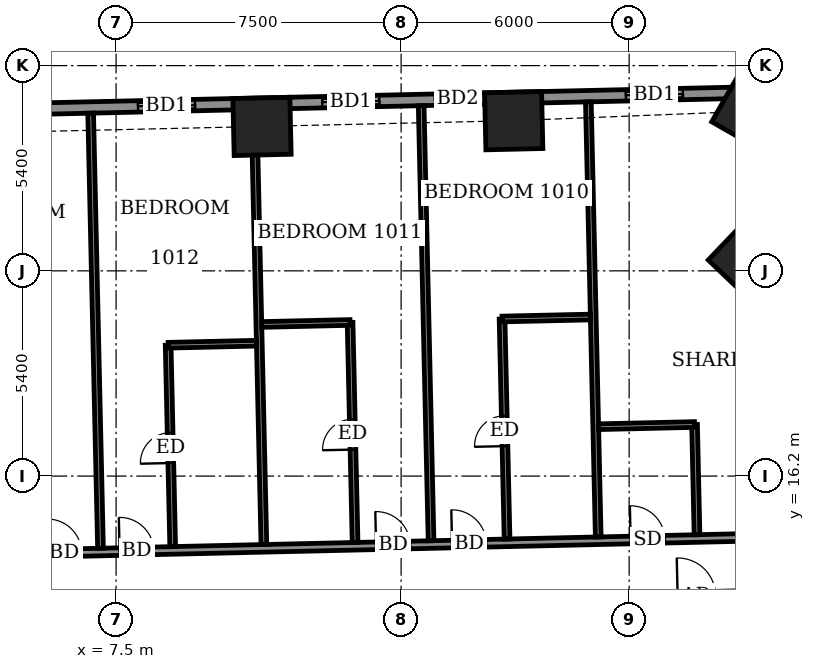
"""IFC4 building model, lengths in metres.
Left out: names, types, materials, properties, quantities, classifications, styles, units other than length and angle.
Written with IfcOpenShell. Run it as: python <this file> out.ifc"""

import sys

from ifc_helpers import new_model, si_unit, direction, frame, frame_2d, origin, origin_2d, place, context, subcontext, project, spatial, rectangle, extrude, element, fill, save


model = new_model("IFC4")
c1 = context("Model", 3, precision=1e-05, world=origin(), true_north=direction((0.0, 1.0)))
c2 = subcontext(c1, "Body", "Model", "MODEL_VIEW")
j1 = project(units=[si_unit("LENGTHUNIT", "METRE"), si_unit("PLANEANGLEUNIT", "RADIAN")], contexts=[c1])
p1 = place(None, origin())
s1 = spatial("IfcSite", under=j1, at=p1, CompositionType="ELEMENT")
p2 = place(p1, origin())
s2 = spatial("IfcBuilding", under=s1, at=p2, CompositionType="ELEMENT")
p3 = place(p2, frame((0.0, 0.0, 44.9)))
s3 = spatial("IfcBuildingStorey", under=s2, at=p3, CompositionType="ELEMENT", Elevation=44.9)
for number, where, z_axis, x_axis in (
    (1, (24.142, 21.91, -0.55), (0.0, 0.0, 1.0), (-0.723, 0.691, 0.0)),
    (2, (24.196, 25.8, -0.55), (0.0, 0.0, 1.0), (-0.868, 0.497, 0.0)),
    (3, (17.963, 25.551, -0.55), (0.0, 0.0, 1.0), (-1.0, -0.023, 0.0)),
    (4, (11.34, 25.4, -0.55), (0.0, 0.0, 1.0), (-1.0, -0.023, 0.0)),
):
    element("IfcColumn", number, at=place(p3, frame(where, z_axis=z_axis, x_axis=x_axis)), inside=s3, PredefinedType="COLUMN", context=c2, shape_type="SweptSolid", body=[
        extrude(rectangle(XDim=1.5, YDim=1.5, at=origin_2d()), origin(), (0.0, 0.0, 1.0), 3.6),
    ])
p4 = place(p3, frame((24.423, 26.298, 0.0), z_axis=(0.0, 0.0, 1.0), x_axis=(-0.999742433108, -0.022695097355, 0.0)))
e5 = element("IfcWall", 5, at=p4, inside=s3, PredefinedType="SOLIDWALL", context=c2, shape_type="SweptSolid", body=[
    extrude(rectangle(XDim=52.701, YDim=0.3, at=frame_2d((26.35, 0.0))), origin(), (0.0, 0.0, 1.0), 3.05),
])
p5 = place(p4, frame((2.009, 0.0, 0.0)))
e6 = element("IfcOpeningElement", 6, at=p5, cuts=e5, PredefinedType="OPENING", context=c2, shape_type="SweptSolid", body=[
    extrude(rectangle(XDim=1.5, YDim=2.4, at=frame_2d((0.75, 1.2))), frame((0.0, 0.16, 0.0), z_axis=(0.0, -1.0, 0.0), x_axis=(1.0, 0.0, 0.0)), (0.0, 0.0, 1.0), 0.32),
])
p6 = place(p4, frame((7.337, 0.0, 0.0)))
e7 = element("IfcOpeningElement", 7, at=p6, cuts=e5, PredefinedType="OPENING", context=c2, shape_type="SweptSolid", body=[
    extrude(rectangle(XDim=1.2, YDim=2.4, at=frame_2d((0.6, 1.2))), frame((0.0, 0.16, 0.0), z_axis=(0.0, -1.0, 0.0), x_axis=(1.0, 0.0, 0.0)), (0.0, 0.0, 1.0), 0.32),
])
p7 = place(p4, frame((10.0, 0.0, 0.0)))
e8 = element("IfcOpeningElement", 8, at=p7, cuts=e5, PredefinedType="OPENING", context=c2, shape_type="SweptSolid", body=[
    extrude(rectangle(XDim=1.5, YDim=2.4, at=frame_2d((0.75, 1.2))), frame((0.0, 0.16, 0.0), z_axis=(0.0, -1.0, 0.0), x_axis=(1.0, 0.0, 0.0)), (0.0, 0.0, 1.0), 0.32),
])
p8 = place(p4, frame((14.85, 0.0, 0.0)))
e9 = element("IfcOpeningElement", 9, at=p8, cuts=e5, PredefinedType="OPENING", context=c2, shape_type="SweptSolid", body=[
    extrude(rectangle(XDim=1.5, YDim=2.4, at=frame_2d((0.75, 1.2))), frame((0.0, 0.16, 0.0), z_axis=(0.0, -1.0, 0.0), x_axis=(1.0, 0.0, 0.0)), (0.0, 0.0, 1.0), 0.32),
])
p9 = place(p4, frame((20.638, 0.0, 0.9)))
e10 = element("IfcOpeningElement", 10, at=p9, cuts=e5, PredefinedType="OPENING", context=c2, shape_type="SweptSolid", body=[
    extrude(rectangle(XDim=0.9, YDim=1.5, at=frame_2d((0.45, 0.75))), frame((0.0, 0.16, 0.0), z_axis=(0.0, -1.0, 0.0), x_axis=(1.0, 0.0, 0.0)), (0.0, 0.0, 1.0), 0.32),
])
p10 = place(p4, frame((23.125, 0.0, 0.0)))
e11 = element("IfcOpeningElement", 11, at=p10, cuts=e5, PredefinedType="OPENING", context=c2, shape_type="SweptSolid", body=[
    extrude(rectangle(XDim=1.5, YDim=2.4, at=frame_2d((0.75, 1.2))), frame((0.0, 0.16, 0.0), z_axis=(0.0, -1.0, 0.0), x_axis=(1.0, 0.0, 0.0)), (0.0, 0.0, 1.0), 0.32),
])
p11 = place(p4, frame((27.9, 0.0, 0.0)))
e12 = element("IfcOpeningElement", 12, at=p11, cuts=e5, PredefinedType="OPENING", context=c2, shape_type="SweptSolid", body=[
    extrude(rectangle(XDim=1.5, YDim=2.4, at=frame_2d((0.75, 1.2))), frame((0.0, 0.16, 0.0), z_axis=(0.0, -1.0, 0.0), x_axis=(1.0, 0.0, 0.0)), (0.0, 0.0, 1.0), 0.32),
])
p12 = place(p4, frame((30.862, 0.0, 0.0)))
e13 = element("IfcOpeningElement", 13, at=p12, cuts=e5, PredefinedType="OPENING", context=c2, shape_type="SweptSolid", body=[
    extrude(rectangle(XDim=1.2, YDim=2.4, at=frame_2d((0.6, 1.2))), frame((0.0, 0.16, 0.0), z_axis=(0.0, -1.0, 0.0), x_axis=(1.0, 0.0, 0.0)), (0.0, 0.0, 1.0), 0.32),
])
p13 = place(p4, frame((36.1, 0.0, 0.0)))
e14 = element("IfcOpeningElement", 14, at=p13, cuts=e5, PredefinedType="OPENING", context=c2, shape_type="SweptSolid", body=[
    extrude(rectangle(XDim=1.5, YDim=2.4, at=frame_2d((0.75, 1.2))), frame((0.0, 0.16, 0.0), z_axis=(0.0, -1.0, 0.0), x_axis=(1.0, 0.0, 0.0)), (0.0, 0.0, 1.0), 0.32),
])
p14 = place(p4, frame((40.975, 0.0, 0.0)))
e15 = element("IfcOpeningElement", 15, at=p14, cuts=e5, PredefinedType="OPENING", context=c2, shape_type="SweptSolid", body=[
    extrude(rectangle(XDim=1.5, YDim=2.4, at=frame_2d((0.75, 1.2))), frame((0.0, 0.16, 0.0), z_axis=(0.0, -1.0, 0.0), x_axis=(1.0, 0.0, 0.0)), (0.0, 0.0, 1.0), 0.32),
])
p15 = place(p4, frame((43.788, 0.0, 0.0)))
e16 = element("IfcOpeningElement", 16, at=p15, cuts=e5, PredefinedType="OPENING", context=c2, shape_type="SweptSolid", body=[
    extrude(rectangle(XDim=1.5, YDim=2.4, at=frame_2d((0.75, 1.2))), frame((0.0, 0.16, 0.0), z_axis=(0.0, -1.0, 0.0), x_axis=(1.0, 0.0, 0.0)), (0.0, 0.0, 1.0), 0.32),
])
p16 = place(p4, frame((48.464, 0.0, 0.9)))
e17 = element("IfcOpeningElement", 17, at=p16, cuts=e5, PredefinedType="OPENING", context=c2, shape_type="SweptSolid", body=[
    extrude(rectangle(XDim=2.4, YDim=1.5, at=frame_2d((1.2, 0.75))), frame((0.0, 0.16, 0.0), z_axis=(0.0, -1.0, 0.0), x_axis=(1.0, 0.0, 0.0)), (0.0, 0.0, 1.0), 0.32),
])
p17 = place(p3, frame((2.746, 27.256, 0.0), z_axis=(0.0, 0.0, 1.0), x_axis=(0.999743073592, 0.022666865795, 0.0)))
e18 = element("IfcWall", 18, at=p17, inside=s3, PredefinedType="USERDEFINED", context=c2, shape_type="SweptSolid", body=[
    extrude(rectangle(XDim=5.999, YDim=0.55, at=frame_2d((3.0, 0.0))), origin(), (0.0, 0.0, 1.0), 0.8),
])
p18 = place(p3, frame((16.679, 12.918, 0.0), z_axis=(0.0, 0.0, 1.0), x_axis=(0.999742162372, 0.022707020428, 0.0)))
e19 = element("IfcWall", 19, at=p18, inside=s3, PredefinedType="PARTITIONING", context=c2, shape_type="SweptSolid", body=[
    extrude(rectangle(XDim=10.795, YDim=0.2, at=frame_2d((5.397, 0.0))), origin(), (0.0, 0.0, 1.0), 3.05),
])
p19 = place(p18, frame((5.598, 0.0, 0.0)))
e20 = element("IfcOpeningElement", 20, at=p19, cuts=e19, PredefinedType="OPENING", context=c2, shape_type="SweptSolid", body=[
    extrude(rectangle(XDim=1.0, YDim=2.1, at=frame_2d((0.5, 1.05))), frame((0.0, 0.11, 0.0), z_axis=(0.0, -1.0, 0.0), x_axis=(1.0, 0.0, 0.0)), (0.0, 0.0, 1.0), 0.22),
])
p20 = place(p3, frame((-31.347, 13.329, 0.0), z_axis=(0.0, 0.0, 1.0), x_axis=(0.999742613079, 0.022687168058, 0.0)))
e21 = element("IfcWall", 21, at=p20, inside=s3, PredefinedType="PARTITIONING", context=c2, shape_type="SweptSolid", body=[
    extrude(rectangle(XDim=58.799, YDim=0.2, at=frame_2d((29.399, 0.0))), origin(), (0.0, 0.0, 1.0), 3.05),
])
p21 = place(p20, frame((56.675, 0.0, 0.0)))
e22 = element("IfcOpeningElement", 22, at=p21, cuts=e21, PredefinedType="OPENING", context=c2, shape_type="SweptSolid", body=[
    extrude(rectangle(XDim=1.0, YDim=2.1, at=frame_2d((0.5, 1.05))), frame((0.0, 0.11, 0.0), z_axis=(0.0, -1.0, 0.0), x_axis=(1.0, 0.0, 0.0)), (0.0, 0.0, 1.0), 0.22),
])
p22 = place(p20, frame((52.4, 0.0, 0.0)))
e23 = element("IfcOpeningElement", 23, at=p22, cuts=e21, PredefinedType="OPENING", context=c2, shape_type="SweptSolid", body=[
    extrude(rectangle(XDim=0.9, YDim=2.1, at=frame_2d((0.45, 1.05))), frame((0.0, 0.11, 0.0), z_axis=(0.0, -1.0, 0.0), x_axis=(1.0, 0.0, 0.0)), (0.0, 0.0, 1.0), 0.22),
])
p23 = place(p20, frame((47.7, 0.0, 0.0)))
e24 = element("IfcOpeningElement", 24, at=p23, cuts=e21, PredefinedType="OPENING", context=c2, shape_type="SweptSolid", body=[
    extrude(rectangle(XDim=0.9, YDim=2.1, at=frame_2d((0.45, 1.05))), frame((0.0, 0.11, 0.0), z_axis=(0.0, -1.0, 0.0), x_axis=(1.0, 0.0, 0.0)), (0.0, 0.0, 1.0), 0.22),
])
p24 = place(p20, frame((45.7, 0.0, 0.0)))
e25 = element("IfcOpeningElement", 25, at=p24, cuts=e21, PredefinedType="OPENING", context=c2, shape_type="SweptSolid", body=[
    extrude(rectangle(XDim=0.9, YDim=2.1, at=frame_2d((0.45, 1.05))), frame((0.0, 0.11, 0.0), z_axis=(0.0, -1.0, 0.0), x_axis=(1.0, 0.0, 0.0)), (0.0, 0.0, 1.0), 0.22),
])
p25 = place(p20, frame((38.95, 0.0, 0.0)))
e26 = element("IfcOpeningElement", 26, at=p25, cuts=e21, PredefinedType="OPENING", context=c2, shape_type="SweptSolid", body=[
    extrude(rectangle(XDim=0.9, YDim=2.1, at=frame_2d((0.45, 1.05))), frame((0.0, 0.11, 0.0), z_axis=(0.0, -1.0, 0.0), x_axis=(1.0, 0.0, 0.0)), (0.0, 0.0, 1.0), 0.22),
])
p26 = place(p20, frame((37.05, 0.0, 0.0)))
e27 = element("IfcOpeningElement", 27, at=p26, cuts=e21, PredefinedType="OPENING", context=c2, shape_type="SweptSolid", body=[
    extrude(rectangle(XDim=0.9, YDim=2.1, at=frame_2d((0.45, 1.05))), frame((0.0, 0.11, 0.0), z_axis=(0.0, -1.0, 0.0), x_axis=(1.0, 0.0, 0.0)), (0.0, 0.0, 1.0), 0.22),
])
p27 = place(p20, frame((30.375, 0.0, 0.0)))
e28 = element("IfcOpeningElement", 28, at=p27, cuts=e21, PredefinedType="OPENING", context=c2, shape_type="SweptSolid", body=[
    extrude(rectangle(XDim=0.9, YDim=2.1, at=frame_2d((0.45, 1.05))), frame((0.0, 0.11, 0.0), z_axis=(0.0, -1.0, 0.0), x_axis=(1.0, 0.0, 0.0)), (0.0, 0.0, 1.0), 0.22),
])
p28 = place(p20, frame((28.5, 0.0, 0.0)))
e29 = element("IfcOpeningElement", 29, at=p28, cuts=e21, PredefinedType="OPENING", context=c2, shape_type="SweptSolid", body=[
    extrude(rectangle(XDim=0.9, YDim=2.1, at=frame_2d((0.45, 1.05))), frame((0.0, 0.11, 0.0), z_axis=(0.0, -1.0, 0.0), x_axis=(1.0, 0.0, 0.0)), (0.0, 0.0, 1.0), 0.22),
])
p29 = place(p20, frame((21.825, 0.0, 0.0)))
e30 = element("IfcOpeningElement", 30, at=p29, cuts=e21, PredefinedType="OPENING", context=c2, shape_type="SweptSolid", body=[
    extrude(rectangle(XDim=0.9, YDim=2.1, at=frame_2d((0.45, 1.05))), frame((0.0, 0.11, 0.0), z_axis=(0.0, -1.0, 0.0), x_axis=(1.0, 0.0, 0.0)), (0.0, 0.0, 1.0), 0.22),
])
p30 = place(p20, frame((19.95, 0.0, 0.0)))
e31 = element("IfcOpeningElement", 31, at=p30, cuts=e21, PredefinedType="OPENING", context=c2, shape_type="SweptSolid", body=[
    extrude(rectangle(XDim=0.9, YDim=2.1, at=frame_2d((0.45, 1.05))), frame((0.0, 0.11, 0.0), z_axis=(0.0, -1.0, 0.0), x_axis=(1.0, 0.0, 0.0)), (0.0, 0.0, 1.0), 0.22),
])
p31 = place(p20, frame((13.225, 0.0, 0.0)))
e32 = element("IfcOpeningElement", 32, at=p31, cuts=e21, PredefinedType="OPENING", context=c2, shape_type="SweptSolid", body=[
    extrude(rectangle(XDim=0.9, YDim=2.1, at=frame_2d((0.45, 1.05))), frame((0.0, 0.11, 0.0), z_axis=(0.0, -1.0, 0.0), x_axis=(1.0, 0.0, 0.0)), (0.0, 0.0, 1.0), 0.22),
])
p32 = place(p20, frame((11.25, 0.0, 0.0)))
e33 = element("IfcOpeningElement", 33, at=p32, cuts=e21, PredefinedType="OPENING", context=c2, shape_type="SweptSolid", body=[
    extrude(rectangle(XDim=0.9, YDim=2.1, at=frame_2d((0.45, 1.05))), frame((0.0, 0.11, 0.0), z_axis=(0.0, -1.0, 0.0), x_axis=(1.0, 0.0, 0.0)), (0.0, 0.0, 1.0), 0.22),
])
p33 = place(p20, frame((1.75, 0.0, 0.0)))
e34 = element("IfcOpeningElement", 34, at=p33, cuts=e21, PredefinedType="OPENING", context=c2, shape_type="SweptSolid", body=[
    extrude(rectangle(XDim=1.0, YDim=2.1, at=frame_2d((0.5, 1.05))), frame((0.0, 0.11, 0.0), z_axis=(0.0, -1.0, 0.0), x_axis=(1.0, 0.0, 0.0)), (0.0, 0.0, 1.0), 0.22),
])
p34 = place(p20, frame((6.65, 0.0, 0.0)))
e35 = element("IfcOpeningElement", 35, at=p34, cuts=e21, PredefinedType="OPENING", context=c2, shape_type="SweptSolid", body=[
    extrude(rectangle(XDim=0.9, YDim=2.1, at=frame_2d((0.45, 1.05))), frame((0.0, 0.11, 0.0), z_axis=(0.0, -1.0, 0.0), x_axis=(1.0, 0.0, 0.0)), (0.0, 0.0, 1.0), 0.22),
])
p35 = place(p3, frame((7.09, 14.301, 0.0), z_axis=(0.0, 0.0, 1.0), x_axis=(-0.022621153305, 0.999744108971, 0.0)))
e36 = element("IfcWall", 36, at=p35, inside=s3, PredefinedType="PARTITIONING", context=c2, shape_type="SweptSolid", body=[
    extrude(rectangle(XDim=11.451, YDim=0.15, at=frame_2d((5.726, 0.0))), origin(), (0.0, 0.0, 1.0), 2.55),
])
p36 = place(p3, frame((8.99, 14.344, 0.0), z_axis=(0.0, 0.0, 1.0), x_axis=(-0.022615729912, 0.999744231672, 0.0)))
e37 = element("IfcWall", 37, at=p36, inside=s3, PredefinedType="PARTITIONING", context=c2, shape_type="SweptSolid", body=[
    extrude(rectangle(XDim=5.301, YDim=0.15, at=frame_2d((2.65, 0.0))), origin(), (0.0, 0.0, 1.0), 3.05),
])
p37 = place(p36, frame((2.2, 0.0, 0.0)))
e38 = element("IfcOpeningElement", 38, at=p37, cuts=e37, PredefinedType="OPENING", context=c2, shape_type="SweptSolid", body=[
    extrude(rectangle(XDim=0.8, YDim=2.1, at=frame_2d((0.4, 1.05))), frame((0.0, 0.085, 0.0), z_axis=(0.0, -1.0, 0.0), x_axis=(1.0, 0.0, 0.0)), (0.0, 0.0, 1.0), 0.17),
])
p38 = place(p3, frame((11.389, 14.399, 0.0), z_axis=(0.0, 0.0, 1.0), x_axis=(-0.022708327922, 0.999742132674, 0.0)))
e39 = element("IfcWall", 39, at=p38, inside=s3, PredefinedType="PARTITIONING", context=c2, shape_type="SweptSolid", body=[
    extrude(rectangle(XDim=11.45, YDim=0.15, at=frame_2d((5.725, 0.0))), origin(), (0.0, 0.0, 1.0), 3.05),
])
p39 = place(p3, frame((13.789, 14.453, 0.0), z_axis=(0.0, 0.0, 1.0), x_axis=(-0.022809516176, 0.999739829141, 0.0)))
e40 = element("IfcWall", 40, at=p39, inside=s3, PredefinedType="PARTITIONING", context=c2, shape_type="SweptSolid", body=[
    extrude(rectangle(XDim=5.791, YDim=0.15, at=frame_2d((2.895, 0.0))), origin(), (0.0, 0.0, 1.0), 3.05),
])
p40 = place(p39, frame((2.445, 0.0, 0.0)))
e41 = element("IfcOpeningElement", 41, at=p40, cuts=e40, PredefinedType="OPENING", context=c2, shape_type="SweptSolid", body=[
    extrude(rectangle(XDim=0.8, YDim=2.1, at=frame_2d((0.4, 1.05))), frame((0.0, 0.085, 0.0), z_axis=(0.0, -1.0, 0.0), x_axis=(1.0, 0.0, 0.0)), (0.0, 0.0, 1.0), 0.17),
])
p41 = place(p3, frame((15.788, 14.499, 0.0), z_axis=(0.0, 0.0, 1.0), x_axis=(-0.022708327922, 0.999742132674, 0.0)))
e42 = element("IfcWall", 42, at=p41, inside=s3, PredefinedType="PARTITIONING", context=c2, shape_type="SweptSolid", body=[
    extrude(rectangle(XDim=11.45, YDim=0.15, at=frame_2d((5.725, 0.0))), origin(), (0.0, 0.0, 1.0), 2.55),
])
p42 = place(p3, frame((17.788, 14.544, 0.0), z_axis=(0.0, 0.0, 1.0), x_axis=(-0.022809516176, 0.999739829141, 0.0)))
e43 = element("IfcWall", 43, at=p42, inside=s3, PredefinedType="PARTITIONING", context=c2, shape_type="SweptSolid", body=[
    extrude(rectangle(XDim=5.791, YDim=0.15, at=frame_2d((2.895, 0.0))), origin(), (0.0, 0.0, 1.0), 3.05),
])
p43 = place(p42, frame((2.445, 0.0, 0.0)))
e44 = element("IfcOpeningElement", 44, at=p43, cuts=e43, PredefinedType="OPENING", context=c2, shape_type="SweptSolid", body=[
    extrude(rectangle(XDim=0.8, YDim=2.1, at=frame_2d((0.4, 1.05))), frame((0.0, 0.085, 0.0), z_axis=(0.0, -1.0, 0.0), x_axis=(1.0, 0.0, 0.0)), (0.0, 0.0, 1.0), 0.17),
])
p44 = place(p3, frame((20.187, 14.598, 0.0), z_axis=(0.0, 0.0, 1.0), x_axis=(-0.022706391805, 0.999742176649, 0.0)))
e45 = element("IfcWall", 45, at=p44, inside=s3, PredefinedType="PARTITIONING", context=c2, shape_type="SweptSolid", body=[
    extrude(rectangle(XDim=11.451, YDim=0.15, at=frame_2d((5.726, 0.0))), origin(), (0.0, 0.0, 1.0), 2.55),
])
p45 = place(p3, frame((22.786, 14.657, 0.0), z_axis=(0.0, 0.0, 1.0), x_axis=(-0.022388729138, 0.999749340989, 0.0)))
e46 = element("IfcWall", 46, at=p45, inside=s3, PredefinedType="PARTITIONING", context=c2, shape_type="SweptSolid", body=[
    extrude(rectangle(XDim=2.901, YDim=0.15, at=frame_2d((1.45, 0.0))), origin(), (0.0, 0.0, 1.0), 3.05),
])
p46 = place(p3, frame((20.196, 17.499, 0.0), z_axis=(0.0, 0.0, 1.0), x_axis=(0.999737525802, 0.022910248851, 0.0)))
e47 = element("IfcWall", 47, at=p46, inside=s3, PredefinedType="PARTITIONING", context=c2, shape_type="SweptSolid", body=[
    extrude(rectangle(XDim=2.526, YDim=0.15, at=frame_2d((1.263, 0.0))), origin(), (0.0, 0.0, 1.0), 3.05),
])
for number, where, z_axis, x_axis in (
    (48, (8.87, 19.643, 0.0), (0.0, 0.0, 1.0), (1.0, 0.023, 0.0)),
    (49, (11.333, 20.189, 0.0), (0.0, 0.0, 1.0), (1.0, 0.023, 0.0)),
):
    element("IfcWall", number, at=place(p3, frame(where, z_axis=z_axis, x_axis=x_axis)), inside=s3, PredefinedType="PARTITIONING", context=c2, shape_type="SweptSolid", body=[
        extrude(rectangle(XDim=2.324, YDim=0.15, at=frame_2d((1.162, 0.0))), origin(), (0.0, 0.0, 1.0), 3.05),
    ])
p47 = place(p3, frame((17.656, 20.333, 0.0), z_axis=(0.0, 0.0, 1.0), x_axis=(0.999749954681, 0.022361308448, 0.0)))
e50 = element("IfcWall", 50, at=p47, inside=s3, PredefinedType="PARTITIONING", context=c2, shape_type="SweptSolid", body=[
    extrude(rectangle(XDim=2.325, YDim=0.15, at=frame_2d((1.163, 0.0))), origin(), (0.0, 0.0, 1.0), 3.05),
])
p48 = place(p5, origin())
e51 = element("IfcDoor", 51, at=p48, inside=s3, OperationType="SLIDING_TO_LEFT", PredefinedType="DOOR", context=c2, shape_type="SweptSolid", body=[
    extrude(rectangle(XDim=1.5, YDim=2.4, at=frame_2d((0.75, 1.2))), frame((0.0, 0.025, 0.0), z_axis=(0.0, -1.0, 0.0), x_axis=(1.0, 0.0, 0.0)), (0.0, 0.0, 1.0), 0.05),
])
fill(e6, e51)
p49 = place(p6, origin())
e52 = element("IfcDoor", 52, at=p49, inside=s3, OperationType="SLIDING_TO_LEFT", PredefinedType="DOOR", context=c2, shape_type="SweptSolid", body=[
    extrude(rectangle(XDim=1.2, YDim=2.4, at=frame_2d((0.6, 1.2))), frame((0.0, 0.025, 0.0), z_axis=(0.0, -1.0, 0.0), x_axis=(1.0, 0.0, 0.0)), (0.0, 0.0, 1.0), 0.05),
])
fill(e7, e52)
p50 = place(p7, origin())
e53 = element("IfcDoor", 53, at=p50, inside=s3, OperationType="SLIDING_TO_LEFT", PredefinedType="DOOR", context=c2, shape_type="SweptSolid", body=[
    extrude(rectangle(XDim=1.5, YDim=2.4, at=frame_2d((0.75, 1.2))), frame((0.0, 0.025, 0.0), z_axis=(0.0, -1.0, 0.0), x_axis=(1.0, 0.0, 0.0)), (0.0, 0.0, 1.0), 0.05),
])
fill(e8, e53)
p51 = place(p8, origin())
e54 = element("IfcDoor", 54, at=p51, inside=s3, OperationType="SLIDING_TO_LEFT", PredefinedType="DOOR", context=c2, shape_type="SweptSolid", body=[
    extrude(rectangle(XDim=1.5, YDim=2.4, at=frame_2d((0.75, 1.2))), frame((0.0, 0.025, 0.0), z_axis=(0.0, -1.0, 0.0), x_axis=(1.0, 0.0, 0.0)), (0.0, 0.0, 1.0), 0.05),
])
fill(e9, e54)
p52 = place(p22, origin())
e55 = element("IfcDoor", 55, at=p52, inside=s3, OperationType="SINGLE_SWING_RIGHT", PredefinedType="DOOR", context=c2, shape_type="SweptSolid", body=[
    extrude(rectangle(XDim=0.9, YDim=2.1, at=frame_2d((0.45, 1.05))), frame((0.0, 0.025, 0.0), z_axis=(0.0, -1.0, 0.0), x_axis=(1.0, 0.0, 0.0)), (0.0, 0.0, 1.0), 0.05),
])
fill(e23, e55)
p53 = place(p23, origin())
e56 = element("IfcDoor", 56, at=p53, inside=s3, OperationType="SINGLE_SWING_RIGHT", PredefinedType="DOOR", context=c2, shape_type="SweptSolid", body=[
    extrude(rectangle(XDim=0.9, YDim=2.1, at=frame_2d((0.45, 1.05))), frame((0.0, 0.025, 0.0), z_axis=(0.0, -1.0, 0.0), x_axis=(1.0, 0.0, 0.0)), (0.0, 0.0, 1.0), 0.05),
])
fill(e24, e56)
p54 = place(p43, origin())
e57 = element("IfcDoor", 57, at=p54, inside=s3, OperationType="SINGLE_SWING_RIGHT", PredefinedType="DOOR", context=c2, shape_type="SweptSolid", body=[
    extrude(rectangle(XDim=0.8, YDim=2.1, at=frame_2d((0.4, 1.05))), frame((0.0, 0.025, 0.0), z_axis=(0.0, -1.0, 0.0), x_axis=(1.0, 0.0, 0.0)), (0.0, 0.0, 1.0), 0.05),
])
fill(e44, e57)
p55 = place(p24, origin())
e58 = element("IfcDoor", 58, at=p55, inside=s3, OperationType="SINGLE_SWING_LEFT", PredefinedType="DOOR", context=c2, shape_type="SweptSolid", body=[
    extrude(rectangle(XDim=0.9, YDim=2.1, at=frame_2d((0.45, 1.05))), frame((0.0, 0.025, 0.0), z_axis=(0.0, -1.0, 0.0), x_axis=(1.0, 0.0, 0.0)), (0.0, 0.0, 1.0), 0.05),
])
fill(e25, e58)
p56 = place(p40, origin())
e59 = element("IfcDoor", 59, at=p56, inside=s3, OperationType="SINGLE_SWING_LEFT", PredefinedType="DOOR", context=c2, shape_type="SweptSolid", body=[
    extrude(rectangle(XDim=0.8, YDim=2.1, at=frame_2d((0.4, 1.05))), frame((0.0, 0.025, 0.0), z_axis=(0.0, -1.0, 0.0), x_axis=(1.0, 0.0, 0.0)), (0.0, 0.0, 1.0), 0.05),
])
fill(e41, e59)
p57 = place(p25, origin())
e60 = element("IfcDoor", 60, at=p57, inside=s3, OperationType="SINGLE_SWING_RIGHT", PredefinedType="DOOR", context=c2, shape_type="SweptSolid", body=[
    extrude(rectangle(XDim=0.9, YDim=2.1, at=frame_2d((0.45, 1.05))), frame((0.0, 0.025, 0.0), z_axis=(0.0, -1.0, 0.0), x_axis=(1.0, 0.0, 0.0)), (0.0, 0.0, 1.0), 0.05),
])
fill(e26, e60)
p58 = place(p37, origin())
e61 = element("IfcDoor", 61, at=p58, inside=s3, OperationType="SINGLE_SWING_RIGHT", PredefinedType="DOOR", context=c2, shape_type="SweptSolid", body=[
    extrude(rectangle(XDim=0.8, YDim=2.1, at=frame_2d((0.4, 1.05))), frame((0.0, 0.025, 0.0), z_axis=(0.0, -1.0, 0.0), x_axis=(1.0, 0.0, 0.0)), (0.0, 0.0, 1.0), 0.05),
])
fill(e38, e61)
p59 = place(p26, origin())
e62 = element("IfcDoor", 62, at=p59, inside=s3, OperationType="SINGLE_SWING_LEFT", PredefinedType="DOOR", context=c2, shape_type="SweptSolid", body=[
    extrude(rectangle(XDim=0.9, YDim=2.1, at=frame_2d((0.45, 1.05))), frame((0.0, 0.025, 0.0), z_axis=(0.0, -1.0, 0.0), x_axis=(1.0, 0.0, 0.0)), (0.0, 0.0, 1.0), 0.05),
])
fill(e27, e62)
save(model, sys.argv[1])
